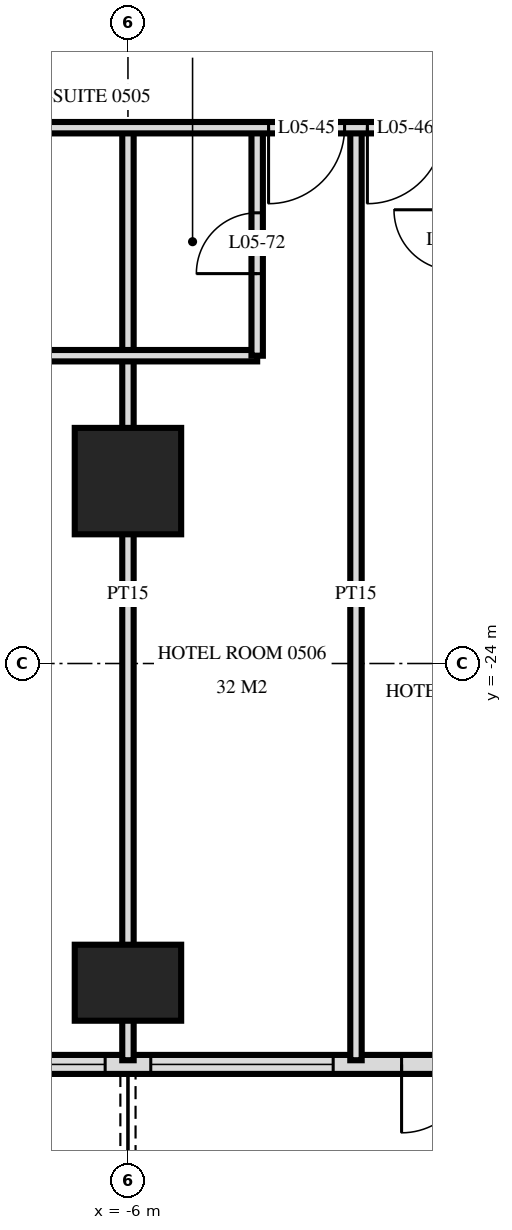
"""IFC4 building model, lengths in metres.
Left out: names, types, materials, properties, quantities, classifications, styles, units other than length and angle.
Written with IfcOpenShell. Run it as: python <this file> out.ifc"""

import sys

from ifc_helpers import new_model, si_unit, direction, frame, frame_2d, origin, origin_2d, place, context, subcontext, project, spatial, rectangle, extrude, element, fill, save


model = new_model("IFC4")
c1 = context("Model", 3, precision=1e-05, world=origin(), true_north=direction((0.0, 1.0)))
c2 = subcontext(c1, "Body", "Model", "MODEL_VIEW")
j1 = project(units=[si_unit("LENGTHUNIT", "METRE"), si_unit("PLANEANGLEUNIT", "RADIAN")], contexts=[c1])
p1 = place(None, origin())
s1 = spatial("IfcSite", under=j1, at=p1, CompositionType="ELEMENT")
p2 = place(p1, origin())
s2 = spatial("IfcBuilding", under=s1, at=p2, CompositionType="ELEMENT")
p3 = place(p2, frame((0.0, 0.0, 27.6)))
s3 = spatial("IfcBuildingStorey", under=s2, at=p3, CompositionType="ELEMENT", Elevation=27.6)
p4 = place(p3, frame((-6.0, -28.2, 0.0), z_axis=(0.0, 0.0, 1.0), x_axis=(1.0, 0.0, 0.0)))
e1 = element("IfcColumn", 1, at=p4, inside=s3, PredefinedType="COLUMN", context=c2, shape_type="SweptSolid", body=[
    extrude(rectangle(XDim=1.4, YDim=1.0, at=origin_2d()), origin(), (0.0, 0.0, 1.0), 3.6),
])
p5 = place(p3, frame((-6.0, -21.6, 0.0), z_axis=(0.0, 0.0, 1.0), x_axis=(1.0, 0.0, 0.0)))
e2 = element("IfcColumn", 2, at=p5, inside=s3, PredefinedType="COLUMN", context=c2, shape_type="SweptSolid", body=[
    extrude(rectangle(XDim=1.4, YDim=1.4, at=origin_2d()), origin(), (0.0, 0.0, 1.0), 3.6),
])
p6 = place(p3, frame((-28.775, -29.275, 0.0), z_axis=(0.0, 0.0, 1.0), x_axis=(1.0, 0.0, 0.0)))
e3 = element("IfcWall", 3, at=p6, inside=s3, PredefinedType="SOLIDWALL", context=c2, shape_type="SweptSolid", body=[
    extrude(rectangle(XDim=57.551, YDim=0.25, at=frame_2d((28.775, 0.0))), origin(), (0.0, 0.0, 1.0), 3.32),
])
p7 = place(p6, frame((0.575, 0.0, 0.0)))
e4 = element("IfcOpeningElement", 4, at=p7, cuts=e3, PredefinedType="OPENING", context=c2, shape_type="SweptSolid", body=[
    extrude(rectangle(XDim=1.8, YDim=2.4, at=frame_2d((0.9, 1.2))), frame((0.0, 0.135, 0.0), z_axis=(0.0, -1.0, 0.0), x_axis=(1.0, 0.0, 0.0)), (0.0, 0.0, 1.0), 0.27),
])
p8 = place(p6, frame((5.375, 0.0, 0.0)))
e5 = element("IfcOpeningElement", 5, at=p8, cuts=e3, PredefinedType="OPENING", context=c2, shape_type="SweptSolid", body=[
    extrude(rectangle(XDim=1.8, YDim=2.4, at=frame_2d((0.9, 1.2))), frame((0.0, 0.135, 0.0), z_axis=(0.0, -1.0, 0.0), x_axis=(1.0, 0.0, 0.0)), (0.0, 0.0, 1.0), 0.27),
])
p9 = place(p6, frame((8.075, 0.0, 0.3)))
e6 = element("IfcOpeningElement", 6, at=p9, cuts=e3, PredefinedType="OPENING", context=c2, shape_type="SweptSolid", body=[
    extrude(rectangle(XDim=2.4, YDim=2.1, at=frame_2d((1.2, 1.05))), frame((0.0, 0.135, 0.0), z_axis=(0.0, -1.0, 0.0), x_axis=(1.0, 0.0, 0.0)), (0.0, 0.0, 1.0), 0.27),
])
p10 = place(p6, frame((11.375, 0.0, 0.0)))
e7 = element("IfcOpeningElement", 7, at=p10, cuts=e3, PredefinedType="OPENING", context=c2, shape_type="SweptSolid", body=[
    extrude(rectangle(XDim=1.8, YDim=2.4, at=frame_2d((0.9, 1.2))), frame((0.0, 0.135, 0.0), z_axis=(0.0, -1.0, 0.0), x_axis=(1.0, 0.0, 0.0)), (0.0, 0.0, 1.0), 0.27),
])
p11 = place(p6, frame((14.075, 0.0, 0.3)))
e8 = element("IfcOpeningElement", 8, at=p11, cuts=e3, PredefinedType="OPENING", context=c2, shape_type="SweptSolid", body=[
    extrude(rectangle(XDim=2.4, YDim=2.1, at=frame_2d((1.2, 1.05))), frame((0.0, 0.135, 0.0), z_axis=(0.0, -1.0, 0.0), x_axis=(1.0, 0.0, 0.0)), (0.0, 0.0, 1.0), 0.27),
])
p12 = place(p6, frame((17.375, 0.0, 0.0)))
e9 = element("IfcOpeningElement", 9, at=p12, cuts=e3, PredefinedType="OPENING", context=c2, shape_type="SweptSolid", body=[
    extrude(rectangle(XDim=1.8, YDim=2.4, at=frame_2d((0.9, 1.2))), frame((0.0, 0.135, 0.0), z_axis=(0.0, -1.0, 0.0), x_axis=(1.0, 0.0, 0.0)), (0.0, 0.0, 1.0), 0.27),
])
p13 = place(p6, frame((20.075, 0.0, 0.3)))
e10 = element("IfcOpeningElement", 10, at=p13, cuts=e3, PredefinedType="OPENING", context=c2, shape_type="SweptSolid", body=[
    extrude(rectangle(XDim=2.4, YDim=2.1, at=frame_2d((1.2, 1.05))), frame((0.0, 0.135, 0.0), z_axis=(0.0, -1.0, 0.0), x_axis=(1.0, 0.0, 0.0)), (0.0, 0.0, 1.0), 0.27),
])
p14 = place(p6, frame((23.075, 0.0, 0.3)))
e11 = element("IfcOpeningElement", 11, at=p14, cuts=e3, PredefinedType="OPENING", context=c2, shape_type="SweptSolid", body=[
    extrude(rectangle(XDim=2.4, YDim=2.1, at=frame_2d((1.2, 1.05))), frame((0.0, 0.135, 0.0), z_axis=(0.0, -1.0, 0.0), x_axis=(1.0, 0.0, 0.0)), (0.0, 0.0, 1.0), 0.27),
])
p15 = place(p6, frame((26.375, 0.0, 0.0)))
e12 = element("IfcOpeningElement", 12, at=p15, cuts=e3, PredefinedType="OPENING", context=c2, shape_type="SweptSolid", body=[
    extrude(rectangle(XDim=1.8, YDim=2.4, at=frame_2d((0.9, 1.2))), frame((0.0, 0.135, 0.0), z_axis=(0.0, -1.0, 0.0), x_axis=(1.0, 0.0, 0.0)), (0.0, 0.0, 1.0), 0.27),
])
p16 = place(p6, frame((29.375, 0.0, 0.0)))
e13 = element("IfcOpeningElement", 13, at=p16, cuts=e3, PredefinedType="OPENING", context=c2, shape_type="SweptSolid", body=[
    extrude(rectangle(XDim=1.8, YDim=2.4, at=frame_2d((0.9, 1.2))), frame((0.0, 0.135, 0.0), z_axis=(0.0, -1.0, 0.0), x_axis=(1.0, 0.0, 0.0)), (0.0, 0.0, 1.0), 0.27),
])
p17 = place(p6, frame((32.075, 0.0, 0.3)))
e14 = element("IfcOpeningElement", 14, at=p17, cuts=e3, PredefinedType="OPENING", context=c2, shape_type="SweptSolid", body=[
    extrude(rectangle(XDim=2.4, YDim=2.1, at=frame_2d((1.2, 1.05))), frame((0.0, 0.135, 0.0), z_axis=(0.0, -1.0, 0.0), x_axis=(1.0, 0.0, 0.0)), (0.0, 0.0, 1.0), 0.27),
])
p18 = place(p6, frame((35.375, 0.0, 0.0)))
e15 = element("IfcOpeningElement", 15, at=p18, cuts=e3, PredefinedType="OPENING", context=c2, shape_type="SweptSolid", body=[
    extrude(rectangle(XDim=1.8, YDim=2.4, at=frame_2d((0.9, 1.2))), frame((0.0, 0.135, 0.0), z_axis=(0.0, -1.0, 0.0), x_axis=(1.0, 0.0, 0.0)), (0.0, 0.0, 1.0), 0.27),
])
p19 = place(p6, frame((38.075, 0.0, 0.3)))
e16 = element("IfcOpeningElement", 16, at=p19, cuts=e3, PredefinedType="OPENING", context=c2, shape_type="SweptSolid", body=[
    extrude(rectangle(XDim=2.4, YDim=2.1, at=frame_2d((1.2, 1.05))), frame((0.0, 0.135, 0.0), z_axis=(0.0, -1.0, 0.0), x_axis=(1.0, 0.0, 0.0)), (0.0, 0.0, 1.0), 0.27),
])
p20 = place(p6, frame((41.375, 0.0, 0.0)))
e17 = element("IfcOpeningElement", 17, at=p20, cuts=e3, PredefinedType="OPENING", context=c2, shape_type="SweptSolid", body=[
    extrude(rectangle(XDim=1.8, YDim=2.4, at=frame_2d((0.9, 1.2))), frame((0.0, 0.135, 0.0), z_axis=(0.0, -1.0, 0.0), x_axis=(1.0, 0.0, 0.0)), (0.0, 0.0, 1.0), 0.27),
])
p21 = place(p6, frame((44.075, 0.0, 0.3)))
e18 = element("IfcOpeningElement", 18, at=p21, cuts=e3, PredefinedType="OPENING", context=c2, shape_type="SweptSolid", body=[
    extrude(rectangle(XDim=2.4, YDim=2.1, at=frame_2d((1.2, 1.05))), frame((0.0, 0.135, 0.0), z_axis=(0.0, -1.0, 0.0), x_axis=(1.0, 0.0, 0.0)), (0.0, 0.0, 1.0), 0.27),
])
p22 = place(p6, frame((47.075, 0.0, 0.3)))
e19 = element("IfcOpeningElement", 19, at=p22, cuts=e3, PredefinedType="OPENING", context=c2, shape_type="SweptSolid", body=[
    extrude(rectangle(XDim=2.4, YDim=2.1, at=frame_2d((1.2, 1.05))), frame((0.0, 0.135, 0.0), z_axis=(0.0, -1.0, 0.0), x_axis=(1.0, 0.0, 0.0)), (0.0, 0.0, 1.0), 0.27),
])
p23 = place(p6, frame((50.375, 0.0, 0.0)))
e20 = element("IfcOpeningElement", 20, at=p23, cuts=e3, PredefinedType="OPENING", context=c2, shape_type="SweptSolid", body=[
    extrude(rectangle(XDim=1.8, YDim=2.4, at=frame_2d((0.9, 1.2))), frame((0.0, 0.135, 0.0), z_axis=(0.0, -1.0, 0.0), x_axis=(1.0, 0.0, 0.0)), (0.0, 0.0, 1.0), 0.27),
])
p24 = place(p6, frame((53.375, 0.0, 0.0)))
e21 = element("IfcOpeningElement", 21, at=p24, cuts=e3, PredefinedType="OPENING", context=c2, shape_type="SweptSolid", body=[
    extrude(rectangle(XDim=1.8, YDim=2.4, at=frame_2d((0.9, 1.2))), frame((0.0, 0.135, 0.0), z_axis=(0.0, -1.0, 0.0), x_axis=(1.0, 0.0, 0.0)), (0.0, 0.0, 1.0), 0.27),
])
p25 = place(p3, frame((-3.0, -29.22, 0.0), z_axis=(0.0, 0.0, 1.0), x_axis=(0.0, 1.0, 0.0)))
e22 = element("IfcWall", 22, at=p25, inside=s3, PredefinedType="PARTITIONING", context=c2, shape_type="SweptSolid", body=[
    extrude(rectangle(XDim=12.27, YDim=0.15, at=frame_2d((6.135, 0.0))), origin(), (0.0, 0.0, 1.0), 3.32),
])
p26 = place(p3, frame((-4.3, -19.95, 0.0), z_axis=(0.0, 0.0, 1.0), x_axis=(0.0, 1.0, 0.0)))
e23 = element("IfcWall", 23, at=p26, inside=s3, PredefinedType="PARTITIONING", context=c2, shape_type="SweptSolid", body=[
    extrude(rectangle(XDim=3.0, YDim=0.15, at=frame_2d((1.5, 0.0))), origin(), (0.0, 0.0, 1.0), 3.32),
])
p27 = place(p26, frame((1.08, 0.0, 0.0)))
e24 = element("IfcOpeningElement", 24, at=p27, cuts=e23, PredefinedType="OPENING", context=c2, shape_type="SweptSolid", body=[
    extrude(rectangle(XDim=0.8, YDim=2.1, at=frame_2d((0.4, 1.05))), frame((0.0, 0.085, 0.0), z_axis=(0.0, -1.0, 0.0), x_axis=(1.0, 0.0, 0.0)), (0.0, 0.0, 1.0), 0.17),
])
p28 = place(p3, frame((-6.0, -29.22, 0.0), z_axis=(0.0, 0.0, 1.0), x_axis=(0.0, 1.0, 0.0)))
e25 = element("IfcWall", 25, at=p28, inside=s3, PredefinedType="PARTITIONING", context=c2, shape_type="SweptSolid", body=[
    extrude(rectangle(XDim=12.27, YDim=0.15, at=frame_2d((6.135, 0.0))), origin(), (0.0, 0.0, 1.0), 3.32),
])
p29 = place(p3, frame((-8.7, -19.95, 0.0), z_axis=(0.0, 0.0, 1.0), x_axis=(1.0, 0.0, 0.0)))
e26 = element("IfcWall", 26, at=p29, inside=s3, PredefinedType="PARTITIONING", context=c2, shape_type="SweptSolid", body=[
    extrude(rectangle(XDim=4.4, YDim=0.15, at=frame_2d((2.2, 0.0))), origin(), (0.0, 0.0, 1.0), 3.32),
])
p30 = place(p3, frame((-33.12, -16.95, 0.0), z_axis=(0.0, 0.0, 1.0), x_axis=(1.0, 0.0, 0.0)))
e27 = element("IfcWall", 27, at=p30, inside=s3, PredefinedType="PARTITIONING", context=c2, shape_type="SweptSolid", body=[
    extrude(rectangle(XDim=66.24, YDim=0.15, at=frame_2d((33.12, 0.0))), origin(), (0.0, 0.0, 1.0), 3.32),
])
p31 = place(p30, frame((9.27, 0.0, 0.0)))
e28 = element("IfcOpeningElement", 28, at=p31, cuts=e27, PredefinedType="OPENING", context=c2, shape_type="SweptSolid", body=[
    extrude(rectangle(XDim=1.0, YDim=2.1, at=frame_2d((0.5, 1.05))), frame((0.0, 0.085, 0.0), z_axis=(0.0, -1.0, 0.0), x_axis=(1.0, 0.0, 0.0)), (0.0, 0.0, 1.0), 0.17),
])
p32 = place(p30, frame((13.97, 0.0, 0.0)))
e29 = element("IfcOpeningElement", 29, at=p32, cuts=e27, PredefinedType="OPENING", context=c2, shape_type="SweptSolid", body=[
    extrude(rectangle(XDim=1.0, YDim=2.1, at=frame_2d((0.5, 1.05))), frame((0.0, 0.085, 0.0), z_axis=(0.0, -1.0, 0.0), x_axis=(1.0, 0.0, 0.0)), (0.0, 0.0, 1.0), 0.17),
])
p33 = place(p30, frame((15.27, 0.0, 0.0)))
e30 = element("IfcOpeningElement", 30, at=p33, cuts=e27, PredefinedType="OPENING", context=c2, shape_type="SweptSolid", body=[
    extrude(rectangle(XDim=1.0, YDim=2.1, at=frame_2d((0.5, 1.05))), frame((0.0, 0.085, 0.0), z_axis=(0.0, -1.0, 0.0), x_axis=(1.0, 0.0, 0.0)), (0.0, 0.0, 1.0), 0.17),
])
p34 = place(p30, frame((19.97, 0.0, 0.0)))
e31 = element("IfcOpeningElement", 31, at=p34, cuts=e27, PredefinedType="OPENING", context=c2, shape_type="SweptSolid", body=[
    extrude(rectangle(XDim=1.0, YDim=2.1, at=frame_2d((0.5, 1.05))), frame((0.0, 0.085, 0.0), z_axis=(0.0, -1.0, 0.0), x_axis=(1.0, 0.0, 0.0)), (0.0, 0.0, 1.0), 0.17),
])
p35 = place(p30, frame((22.27, 0.0, 0.0)))
e32 = element("IfcOpeningElement", 32, at=p35, cuts=e27, PredefinedType="OPENING", context=c2, shape_type="SweptSolid", body=[
    extrude(rectangle(XDim=1.0, YDim=2.1, at=frame_2d((0.5, 1.05))), frame((0.0, 0.085, 0.0), z_axis=(0.0, -1.0, 0.0), x_axis=(1.0, 0.0, 0.0)), (0.0, 0.0, 1.0), 0.17),
])
p36 = place(p30, frame((28.97, 0.0, 0.0)))
e33 = element("IfcOpeningElement", 33, at=p36, cuts=e27, PredefinedType="OPENING", context=c2, shape_type="SweptSolid", body=[
    extrude(rectangle(XDim=1.0, YDim=2.1, at=frame_2d((0.5, 1.05))), frame((0.0, 0.085, 0.0), z_axis=(0.0, -1.0, 0.0), x_axis=(1.0, 0.0, 0.0)), (0.0, 0.0, 1.0), 0.17),
])
p37 = place(p30, frame((30.27, 0.0, 0.0)))
e34 = element("IfcOpeningElement", 34, at=p37, cuts=e27, PredefinedType="OPENING", context=c2, shape_type="SweptSolid", body=[
    extrude(rectangle(XDim=1.0, YDim=2.1, at=frame_2d((0.5, 1.05))), frame((0.0, 0.085, 0.0), z_axis=(0.0, -1.0, 0.0), x_axis=(1.0, 0.0, 0.0)), (0.0, 0.0, 1.0), 0.17),
])
p38 = place(p30, frame((34.97, 0.0, 0.0)))
e35 = element("IfcOpeningElement", 35, at=p38, cuts=e27, PredefinedType="OPENING", context=c2, shape_type="SweptSolid", body=[
    extrude(rectangle(XDim=1.0, YDim=2.1, at=frame_2d((0.5, 1.05))), frame((0.0, 0.085, 0.0), z_axis=(0.0, -1.0, 0.0), x_axis=(1.0, 0.0, 0.0)), (0.0, 0.0, 1.0), 0.17),
])
p39 = place(p30, frame((36.27, 0.0, 0.0)))
e36 = element("IfcOpeningElement", 36, at=p39, cuts=e27, PredefinedType="OPENING", context=c2, shape_type="SweptSolid", body=[
    extrude(rectangle(XDim=1.0, YDim=2.1, at=frame_2d((0.5, 1.05))), frame((0.0, 0.085, 0.0), z_axis=(0.0, -1.0, 0.0), x_axis=(1.0, 0.0, 0.0)), (0.0, 0.0, 1.0), 0.17),
])
p40 = place(p30, frame((40.97, 0.0, 0.0)))
e37 = element("IfcOpeningElement", 37, at=p40, cuts=e27, PredefinedType="OPENING", context=c2, shape_type="SweptSolid", body=[
    extrude(rectangle(XDim=1.0, YDim=2.1, at=frame_2d((0.5, 1.05))), frame((0.0, 0.085, 0.0), z_axis=(0.0, -1.0, 0.0), x_axis=(1.0, 0.0, 0.0)), (0.0, 0.0, 1.0), 0.17),
])
p41 = place(p30, frame((42.27, 0.0, 0.0)))
e38 = element("IfcOpeningElement", 38, at=p41, cuts=e27, PredefinedType="OPENING", context=c2, shape_type="SweptSolid", body=[
    extrude(rectangle(XDim=1.0, YDim=2.1, at=frame_2d((0.5, 1.05))), frame((0.0, 0.085, 0.0), z_axis=(0.0, -1.0, 0.0), x_axis=(1.0, 0.0, 0.0)), (0.0, 0.0, 1.0), 0.17),
])
p42 = place(p30, frame((46.97, 0.0, 0.0)))
e39 = element("IfcOpeningElement", 39, at=p42, cuts=e27, PredefinedType="OPENING", context=c2, shape_type="SweptSolid", body=[
    extrude(rectangle(XDim=1.0, YDim=2.1, at=frame_2d((0.5, 1.05))), frame((0.0, 0.085, 0.0), z_axis=(0.0, -1.0, 0.0), x_axis=(1.0, 0.0, 0.0)), (0.0, 0.0, 1.0), 0.17),
])
p43 = place(p30, frame((48.27, 0.0, 0.0)))
e40 = element("IfcOpeningElement", 40, at=p43, cuts=e27, PredefinedType="OPENING", context=c2, shape_type="SweptSolid", body=[
    extrude(rectangle(XDim=1.0, YDim=2.1, at=frame_2d((0.5, 1.05))), frame((0.0, 0.085, 0.0), z_axis=(0.0, -1.0, 0.0), x_axis=(1.0, 0.0, 0.0)), (0.0, 0.0, 1.0), 0.17),
])
p44 = place(p30, frame((52.97, 0.0, 0.0)))
e41 = element("IfcOpeningElement", 41, at=p44, cuts=e27, PredefinedType="OPENING", context=c2, shape_type="SweptSolid", body=[
    extrude(rectangle(XDim=1.0, YDim=2.1, at=frame_2d((0.5, 1.05))), frame((0.0, 0.085, 0.0), z_axis=(0.0, -1.0, 0.0), x_axis=(1.0, 0.0, 0.0)), (0.0, 0.0, 1.0), 0.17),
])
p45 = place(p30, frame((54.27, 0.0, 0.0)))
e42 = element("IfcOpeningElement", 42, at=p45, cuts=e27, PredefinedType="OPENING", context=c2, shape_type="SweptSolid", body=[
    extrude(rectangle(XDim=1.0, YDim=2.1, at=frame_2d((0.5, 1.05))), frame((0.0, 0.085, 0.0), z_axis=(0.0, -1.0, 0.0), x_axis=(1.0, 0.0, 0.0)), (0.0, 0.0, 1.0), 0.17),
])
p46 = place(p30, frame((4.4, 0.0, 0.0)))
e43 = element("IfcOpeningElement", 43, at=p46, cuts=e27, PredefinedType="OPENING", context=c2, shape_type="SweptSolid", body=[
    extrude(rectangle(XDim=1.0, YDim=2.1, at=frame_2d((0.5, 1.05))), frame((0.0, 0.085, 0.0), z_axis=(0.0, -1.0, 0.0), x_axis=(1.0, 0.0, 0.0)), (0.0, 0.0, 1.0), 0.17),
])
p47 = place(p30, frame((60.8, 0.0, 0.0)))
e44 = element("IfcOpeningElement", 44, at=p47, cuts=e27, PredefinedType="OPENING", context=c2, shape_type="SweptSolid", body=[
    extrude(rectangle(XDim=1.0, YDim=2.1, at=frame_2d((0.5, 1.05))), frame((0.0, 0.085, 0.0), z_axis=(0.0, -1.0, 0.0), x_axis=(1.0, 0.0, 0.0)), (0.0, 0.0, 1.0), 0.17),
])
p48 = place(p13, origin())
e45 = element("IfcWindow", 45, at=p48, inside=s3, PartitioningType="SINGLE_PANEL", PredefinedType="WINDOW", context=c2, shape_type="SweptSolid", body=[
    extrude(rectangle(XDim=2.4, YDim=2.1, at=frame_2d((1.2, 1.05))), frame((0.0, 0.03, 0.0), z_axis=(0.0, -1.0, 0.0), x_axis=(1.0, 0.0, 0.0)), (0.0, 0.0, 1.0), 0.06),
])
fill(e10, e45)
p49 = place(p14, origin())
e46 = element("IfcWindow", 46, at=p49, inside=s3, PartitioningType="SINGLE_PANEL", PredefinedType="WINDOW", context=c2, shape_type="SweptSolid", body=[
    extrude(rectangle(XDim=2.4, YDim=2.1, at=frame_2d((1.2, 1.05))), frame((0.0, 0.03, 0.0), z_axis=(0.0, -1.0, 0.0), x_axis=(1.0, 0.0, 0.0)), (0.0, 0.0, 1.0), 0.06),
])
fill(e11, e46)
p50 = place(p15, frame((0.9, 0.0, 0.0), z_axis=(0.0, 0.0, 1.0), x_axis=(-1.0, 0.0, 0.0)))
e47 = element("IfcDoor", 47, at=p50, inside=s3, OperationType="DOUBLE_DOOR_SINGLE_SWING", PredefinedType="DOOR", context=c2, shape_type="SweptSolid", body=[
    extrude(rectangle(XDim=1.8, YDim=2.4, at=frame_2d((0.0, 1.2))), frame((0.0, -0.025, 0.0), z_axis=(0.0, 1.0, 0.0), x_axis=(-1.0, 0.0, 0.0)), (0.0, 0.0, 1.0), 0.05),
])
fill(e12, e47)
p51 = place(p36, frame((0.5, 0.0, 0.0), z_axis=(0.0, 0.0, 1.0), x_axis=(-1.0, 0.0, 0.0)))
e48 = element("IfcDoor", 48, at=p51, inside=s3, OperationType="SINGLE_SWING_LEFT", PredefinedType="DOOR", context=c2, shape_type="SweptSolid", body=[
    extrude(rectangle(XDim=1.0, YDim=2.1, at=frame_2d((0.0, 1.05))), frame((0.0, -0.025, 0.0), z_axis=(0.0, 1.0, 0.0), x_axis=(-1.0, 0.0, 0.0)), (0.0, 0.0, 1.0), 0.05),
])
fill(e33, e48)
p52 = place(p37, frame((0.5, 0.0, 0.0), z_axis=(0.0, 0.0, 1.0), x_axis=(-1.0, 0.0, 0.0)))
e49 = element("IfcDoor", 49, at=p52, inside=s3, OperationType="SINGLE_SWING_LEFT", PredefinedType="DOOR", context=c2, shape_type="SweptSolid", body=[
    extrude(rectangle(XDim=1.0, YDim=2.1, at=frame_2d((0.0, 1.05))), frame((0.0, -0.025, 0.0), z_axis=(0.0, 1.0, 0.0), x_axis=(-1.0, 0.0, 0.0)), (0.0, 0.0, 1.0), 0.05),
])
fill(e34, e49)
p53 = place(p27, origin())
e50 = element("IfcDoor", 50, at=p53, inside=s3, OperationType="SINGLE_SWING_RIGHT", PredefinedType="DOOR", context=c2, shape_type="SweptSolid", body=[
    extrude(rectangle(XDim=0.8, YDim=2.1, at=frame_2d((0.4, 1.05))), frame((0.0, 0.025, 0.0), z_axis=(0.0, -1.0, 0.0), x_axis=(1.0, 0.0, 0.0)), (0.0, 0.0, 1.0), 0.05),
])
fill(e24, e50)
save(model, sys.argv[1])
